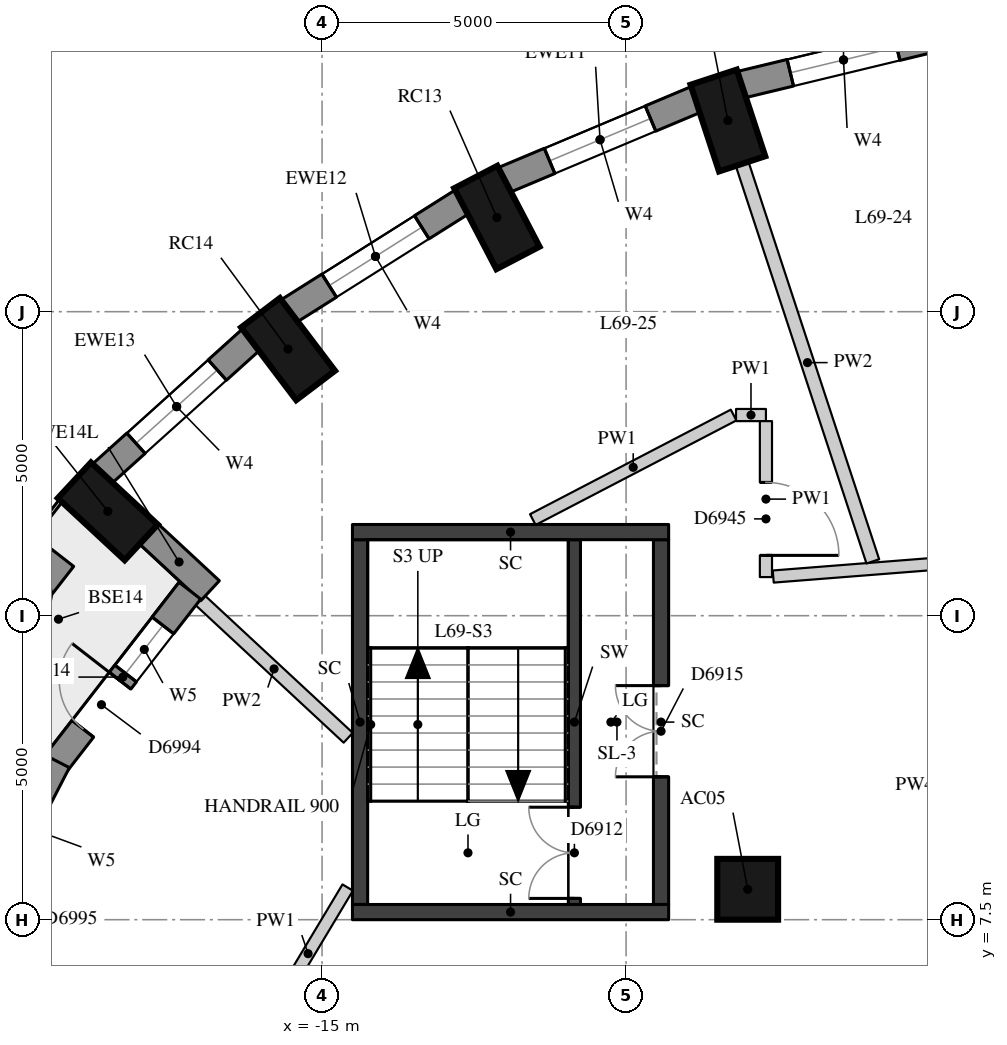
"""IFC4 building model, lengths in metres.
Left out: names, types, materials, properties, quantities, classifications, styles, units other than length and angle.
Written with IfcOpenShell. Run it as: python <this file> out.ifc"""

import sys

from ifc_helpers import new_model, si_unit, direction, frame, frame_2d, origin, origin_2d, place, context, subcontext, project, spatial, rectangle, extrude, element, fill, save


model = new_model("IFC4")
c1 = context("Model", 3, precision=1e-05, world=origin(), true_north=direction((0.0, 1.0)))
c2 = subcontext(c1, "Body", "Model", "MODEL_VIEW")
j1 = project(units=[si_unit("LENGTHUNIT", "METRE"), si_unit("PLANEANGLEUNIT", "RADIAN")], contexts=[c1])
p1 = place(None, origin())
s1 = spatial("IfcSite", under=j1, at=p1, CompositionType="ELEMENT")
p2 = place(p1, origin())
s2 = spatial("IfcBuilding", under=s1, at=p2, CompositionType="ELEMENT")
p3 = place(p2, frame((0.0, 0.0, 243.2)))
s3 = spatial("IfcBuildingStorey", under=s2, at=p3, CompositionType="ELEMENT", Elevation=243.2)
for number, where, z_axis, x_axis in (
    (1, (-8.326, 20.644, 0.0), (0.0, 0.0, 1.0), (-0.312, 0.95, 0.0)),
    (2, (-12.125, 19.05, 0.0), (0.0, 0.0, 1.0), (-0.462, 0.887, 0.0)),
    (3, (-15.559, 16.885, 0.0), (0.0, 0.0, 1.0), (-0.604, 0.797, 0.0)),
    (4, (-18.523, 14.216, 0.0), (0.0, 0.0, 1.0), (-0.733, 0.681, 0.0)),
):
    element("IfcColumn", number, at=place(p3, frame(where, z_axis=z_axis, x_axis=x_axis)), inside=s3, PredefinedType="COLUMN", context=c2, shape_type="SweptSolid", body=[
        extrude(rectangle(XDim=1.5, YDim=0.8, at=origin_2d()), origin(), (0.0, 0.0, 1.0), 3.3),
    ])
p4 = place(p3, frame((-8.0, 8.0, 0.0), z_axis=(0.0, 0.0, 1.0), x_axis=(1.0, 0.0, 0.0)))
e5 = element("IfcColumn", 5, at=p4, inside=s3, PredefinedType="COLUMN", context=c2, shape_type="SweptSolid", body=[
    extrude(rectangle(XDim=1.0, YDim=1.0, at=origin_2d()), origin(), (0.0, 0.0, 1.0), 3.3),
])
p5 = place(p3, frame((-4.729, 22.05, 0.0), z_axis=(0.0, 0.0, 1.0), x_axis=(-0.972099278496, -0.23456980357, 0.0)))
e6 = element("IfcWall", 6, at=p5, inside=s3, PredefinedType="SOLIDWALL", context=c2, shape_type="SweptSolid", body=[
    extrude(rectangle(XDim=3.487, YDim=0.45, at=frame_2d((1.743, 0.0))), origin(), (0.0, 0.0, 1.0), 3.02),
])
p6 = place(p5, frame((0.843, 0.0, 0.4)))
e7 = element("IfcOpeningElement", 7, at=p6, cuts=e6, PredefinedType="OPENING", context=c2, shape_type="SweptSolid", body=[
    extrude(rectangle(XDim=1.8, YDim=1.75, at=frame_2d((0.9, 0.875))), frame((0.0, 0.235, 0.0), z_axis=(0.0, -1.0, 0.0), x_axis=(1.0, 0.0, 0.0)), (0.0, 0.0, 1.0), 0.47),
])
p7 = place(p3, frame((-8.841, 20.995, 0.0), z_axis=(0.0, 0.0, 1.0), x_axis=(-0.922024627475, -0.387131226239, 0.0)))
e8 = element("IfcWall", 8, at=p7, inside=s3, PredefinedType="SOLIDWALL", context=c2, shape_type="SweptSolid", body=[
    extrude(rectangle(XDim=3.443, YDim=0.45, at=frame_2d((1.722, 0.0))), origin(), (0.0, 0.0, 1.0), 3.02),
])
p8 = place(p7, frame((0.822, 0.0, 0.4)))
e9 = element("IfcOpeningElement", 9, at=p8, cuts=e8, PredefinedType="OPENING", context=c2, shape_type="SweptSolid", body=[
    extrude(rectangle(XDim=1.8, YDim=1.75, at=frame_2d((0.9, 0.875))), frame((0.0, 0.235, 0.0), z_axis=(0.0, -1.0, 0.0), x_axis=(1.0, 0.0, 0.0)), (0.0, 0.0, 1.0), 0.47),
])
p9 = place(p3, frame((-12.69, 19.311, 0.0), z_axis=(0.0, 0.0, 1.0), x_axis=(-0.845929139811, -0.53329531258, 0.0)))
e10 = element("IfcWall", 10, at=p9, inside=s3, PredefinedType="SOLIDWALL", context=c2, shape_type="SweptSolid", body=[
    extrude(rectangle(XDim=3.385, YDim=0.45, at=frame_2d((1.692, 0.0))), origin(), (0.0, 0.0, 1.0), 3.02),
])
p10 = place(p9, frame((0.792, 0.0, 0.4)))
e11 = element("IfcOpeningElement", 11, at=p10, cuts=e10, PredefinedType="OPENING", context=c2, shape_type="SweptSolid", body=[
    extrude(rectangle(XDim=1.8, YDim=1.75, at=frame_2d((0.9, 0.875))), frame((0.0, 0.235, 0.0), z_axis=(0.0, -1.0, 0.0), x_axis=(1.0, 0.0, 0.0)), (0.0, 0.0, 1.0), 0.47),
])
p11 = place(p3, frame((-16.159, 17.047, 0.0), z_axis=(0.0, 0.0, 1.0), x_axis=(-0.743166014219, -0.669107073128, 0.0)))
e12 = element("IfcWall", 12, at=p11, inside=s3, PredefinedType="SOLIDWALL", context=c2, shape_type="SweptSolid", body=[
    extrude(rectangle(XDim=3.316, YDim=0.45, at=frame_2d((1.658, 0.0))), origin(), (0.0, 0.0, 1.0), 3.02),
])
p12 = place(p11, frame((0.758, 0.0, 0.4)))
e13 = element("IfcOpeningElement", 13, at=p12, cuts=e12, PredefinedType="OPENING", context=c2, shape_type="SweptSolid", body=[
    extrude(rectangle(XDim=1.8, YDim=1.75, at=frame_2d((0.9, 0.875))), frame((0.0, 0.235, 0.0), z_axis=(0.0, -1.0, 0.0), x_axis=(1.0, 0.0, 0.0)), (0.0, 0.0, 1.0), 0.47),
])
p13 = place(p3, frame((-17.861, 13.857, 0.0), z_axis=(0.0, 0.0, 1.0), x_axis=(0.732605925603, -0.680653037731, 0.0)))
e14 = element("IfcWall", 14, at=p13, inside=s3, PredefinedType="SOLIDWALL", context=c2, shape_type="SweptSolid", body=[
    extrude(rectangle(XDim=1.391, YDim=0.45, at=frame_2d((0.695, 0.0))), origin(), (0.0, 0.0, 1.0), 3.02),
])
p14 = place(p3, frame((-17.174, 12.911, 0.0), z_axis=(0.0, 0.0, 1.0), x_axis=(-0.612774197557, -0.79025804824, 0.0)))
e15 = element("IfcWall", 15, at=p14, inside=s3, PredefinedType="SOLIDWALL", context=c2, shape_type="SweptSolid", body=[
    extrude(rectangle(XDim=3.596, YDim=0.45, at=frame_2d((1.798, 0.0))), origin(), (0.0, 0.0, 1.0), 3.02),
])
p15 = place(p14, frame((0.723, 0.0, 0.4)))
e16 = element("IfcOpeningElement", 16, at=p15, cuts=e15, PredefinedType="OPENING", context=c2, shape_type="SweptSolid", body=[
    extrude(rectangle(XDim=1.0, YDim=1.75, at=frame_2d((0.5, 0.875))), frame((0.0, 0.235, 0.0), z_axis=(0.0, -1.0, 0.0), x_axis=(1.0, 0.0, 0.0)), (0.0, 0.0, 1.0), 0.47),
])
p16 = place(p14, frame((1.873, 0.0, 0.0)))
e17 = element("IfcOpeningElement", 17, at=p16, cuts=e15, PredefinedType="OPENING", context=c2, shape_type="SweptSolid", body=[
    extrude(rectangle(XDim=1.0, YDim=2.15, at=frame_2d((0.5, 1.075))), frame((0.0, 0.235, 0.0), z_axis=(0.0, -1.0, 0.0), x_axis=(1.0, 0.0, 0.0)), (0.0, 0.0, 1.0), 0.47),
])
p17 = place(p3, frame((-19.355, 10.104, 0.0), z_axis=(0.0, 0.0, 1.0), x_axis=(-0.458852093952, -0.888512665006, 0.0)))
e18 = element("IfcWall", 18, at=p17, inside=s3, PredefinedType="SOLIDWALL", context=c2, shape_type="SweptSolid", body=[
    extrude(rectangle(XDim=3.538, YDim=0.45, at=frame_2d((1.769, 0.0))), origin(), (0.0, 0.0, 1.0), 3.02),
])
p18 = place(p17, frame((0.694, 0.0, 0.4)))
e19 = element("IfcOpeningElement", 19, at=p18, cuts=e18, PredefinedType="OPENING", context=c2, shape_type="SweptSolid", body=[
    extrude(rectangle(XDim=1.0, YDim=1.75, at=frame_2d((0.5, 0.875))), frame((0.0, 0.235, 0.0), z_axis=(0.0, -1.0, 0.0), x_axis=(1.0, 0.0, 0.0)), (0.0, 0.0, 1.0), 0.47),
])
p19 = place(p17, frame((1.844, 0.0, 0.0)))
e20 = element("IfcOpeningElement", 20, at=p19, cuts=e18, PredefinedType="OPENING", context=c2, shape_type="SweptSolid", body=[
    extrude(rectangle(XDim=1.0, YDim=2.15, at=frame_2d((0.5, 1.075))), frame((0.0, 0.235, 0.0), z_axis=(0.0, -1.0, 0.0), x_axis=(1.0, 0.0, 0.0)), (0.0, 0.0, 1.0), 0.47),
])
p20 = place(p3, frame((-19.361, 13.525, 0.0), z_axis=(0.0, 0.0, 1.0), x_axis=(-0.613884271235, -0.789396035923, 0.0)))
e21 = element("IfcWall", 21, at=p20, inside=s3, PredefinedType="USERDEFINED", context=c2, shape_type="SweptSolid", body=[
    extrude(rectangle(XDim=1.8, YDim=0.7, at=frame_2d((0.9, 0.0))), origin(), (0.0, 0.0, 1.0), 0.75),
])
p21 = place(p3, frame((-10.85, 7.75, 0.0), z_axis=(0.0, 0.0, 1.0), x_axis=(0.0, 1.0, 0.0)))
e22 = element("IfcWall", 22, at=p21, inside=s3, PredefinedType="SHEAR", context=c2, shape_type="SweptSolid", body=[
    extrude(rectangle(XDim=6.0, YDim=0.2, at=frame_2d((3.0, 0.0))), origin(), (0.0, 0.0, 1.0), 3.02),
])
p22 = place(p21, frame((0.1, 0.0, 0.0)))
e23 = element("IfcOpeningElement", 23, at=p22, cuts=e22, PredefinedType="OPENING", context=c2, shape_type="SweptSolid", body=[
    extrude(rectangle(XDim=1.5, YDim=2.1, at=frame_2d((0.75, 1.05))), frame((0.0, 0.11, 0.0), z_axis=(0.0, -1.0, 0.0), x_axis=(1.0, 0.0, 0.0)), (0.0, 0.0, 1.0), 0.22),
])
p23 = place(p3, frame((-14.375, 7.75, -0.28), z_axis=(0.0, 0.0, 1.0), x_axis=(0.0, 1.0, 0.0)))
e24 = element("IfcWall", 24, at=p23, inside=s3, PredefinedType="SHEAR", context=c2, shape_type="SweptSolid", body=[
    extrude(rectangle(XDim=6.0, YDim=0.25, at=frame_2d((3.0, 0.0))), origin(), (0.0, 0.0, 1.0), 3.3),
])
p24 = place(p3, frame((-9.425, 7.75, -0.28), z_axis=(0.0, 0.0, 1.0), x_axis=(0.0, 1.0, 0.0)))
e25 = element("IfcWall", 25, at=p24, inside=s3, PredefinedType="SHEAR", context=c2, shape_type="SweptSolid", body=[
    extrude(rectangle(XDim=6.0, YDim=0.25, at=frame_2d((3.0, 0.0))), origin(), (0.0, 0.0, 1.0), 3.3),
])
p25 = place(p24, frame((2.1, 0.0, 0.28)))
e26 = element("IfcOpeningElement", 26, at=p25, cuts=e25, PredefinedType="OPENING", context=c2, shape_type="SweptSolid", body=[
    extrude(rectangle(XDim=1.5, YDim=2.1, at=frame_2d((0.75, 1.05))), frame((0.0, 0.135, 0.0), z_axis=(0.0, -1.0, 0.0), x_axis=(1.0, 0.0, 0.0)), (0.0, 0.0, 1.0), 0.27),
])
for number, where, z_axis, x_axis in (
    (27, (-14.5, 13.875, -0.28), (0.0, 0.0, 1.0), (1.0, 0.0, 0.0)),
    (28, (-14.5, 7.625, -0.28), (0.0, 0.0, 1.0), (1.0, 0.0, 0.0)),
):
    element("IfcWall", number, at=place(p3, frame(where, z_axis=z_axis, x_axis=x_axis)), inside=s3, PredefinedType="SHEAR", context=c2, shape_type="SweptSolid", body=[
        extrude(rectangle(XDim=5.2, YDim=0.25, at=frame_2d((2.6, 0.0))), origin(), (0.0, 0.0, 1.0), 3.3),
    ])
p26 = place(p3, frame((-15.882, 5.854, 0.0), z_axis=(0.0, 0.0, 1.0), x_axis=(0.514042598012, 0.857764657368, 0.0)))
e29 = element("IfcWall", 29, at=p26, inside=s3, PredefinedType="PARTITIONING", context=c2, shape_type="SweptSolid", body=[
    extrude(rectangle(XDim=2.536, YDim=0.2, at=frame_2d((1.268, 0.0))), origin(), (0.0, 0.0, 1.0), 3.02),
])
p27 = place(p3, frame((-11.534, 14.081, 0.0), z_axis=(0.0, 0.0, 1.0), x_axis=(0.886975089277, 0.461817270143, 0.0)))
e30 = element("IfcWall", 30, at=p27, inside=s3, PredefinedType="PARTITIONING", context=c2, shape_type="SweptSolid", body=[
    extrude(rectangle(XDim=3.723, YDim=0.2, at=frame_2d((1.861, 0.0))), origin(), (0.0, 0.0, 1.0), 3.02),
])
p28 = place(p3, frame((-8.192, 15.8, 0.0), z_axis=(0.0, 0.0, 1.0), x_axis=(1.0, 0.0, 0.0)))
e31 = element("IfcWall", 31, at=p28, inside=s3, PredefinedType="PARTITIONING", context=c2, shape_type="SweptSolid", body=[
    extrude(rectangle(XDim=0.492, YDim=0.2, at=frame_2d((0.246, 0.0))), origin(), (0.0, 0.0, 1.0), 3.02),
])
p29 = place(p3, frame((-7.7, 15.7, 0.0), z_axis=(0.0, 0.0, 1.0), x_axis=(0.0, -1.0, 0.0)))
e32 = element("IfcWall", 32, at=p29, inside=s3, PredefinedType="PARTITIONING", context=c2, shape_type="SweptSolid", body=[
    extrude(rectangle(XDim=2.565, YDim=0.2, at=frame_2d((1.282, 0.0))), origin(), (0.0, 0.0, 1.0), 3.02),
])
p30 = place(p29, frame((1.008, 0.0, 0.0)))
e33 = element("IfcOpeningElement", 33, at=p30, cuts=e32, PredefinedType="OPENING", context=c2, shape_type="SweptSolid", body=[
    extrude(rectangle(XDim=1.2, YDim=2.1, at=frame_2d((0.6, 1.05))), frame((0.0, 0.11, 0.0), z_axis=(0.0, -1.0, 0.0), x_axis=(1.0, 0.0, 0.0)), (0.0, 0.0, 1.0), 0.22),
])
p31 = place(p3, frame((-7.58, 13.144, 0.0), z_axis=(0.0, 0.0, 1.0), x_axis=(0.996921908045, 0.078400951905, 0.0)))
e34 = element("IfcWall", 34, at=p31, inside=s3, PredefinedType="PARTITIONING", context=c2, shape_type="SweptSolid", body=[
    extrude(rectangle(XDim=10.482, YDim=0.2, at=frame_2d((5.241, 0.0))), origin(), (0.0, 0.0, 1.0), 2.57),
])
p32 = place(p31, frame((6.99, 0.0, 0.0)))
e35 = element("IfcOpeningElement", 35, at=p32, cuts=e34, PredefinedType="OPENING", context=c2, shape_type="SweptSolid", body=[
    extrude(rectangle(XDim=1.1, YDim=2.1, at=frame_2d((0.55, 1.05))), frame((0.0, 0.11, 0.0), z_axis=(0.0, -1.0, 0.0), x_axis=(1.0, 0.0, 0.0)), (0.0, 0.0, 1.0), 0.22),
])
p33 = place(p31, frame((2.696, 0.0, 0.0)))
e36 = element("IfcOpeningElement", 36, at=p33, cuts=e34, PredefinedType="OPENING", context=c2, shape_type="SweptSolid", body=[
    extrude(rectangle(XDim=0.9, YDim=2.1, at=frame_2d((0.45, 1.05))), frame((0.0, 0.11, 0.0), z_axis=(0.0, -1.0, 0.0), x_axis=(1.0, 0.0, 0.0)), (0.0, 0.0, 1.0), 0.22),
])
p34 = place(p3, frame((-8.091, 19.932, 0.0), z_axis=(0.0, 0.0, 1.0), x_axis=(0.312277225251, -0.949991018162, 0.0)))
e37 = element("IfcWall", 37, at=p34, inside=s3, PredefinedType="PARTITIONING", context=c2, shape_type="SweptSolid", body=[
    extrude(rectangle(XDim=6.883, YDim=0.22, at=frame_2d((3.441, 0.0))), origin(), (0.0, 0.0, 1.0), 3.02),
])
p35 = place(p3, frame((-17.009, 12.758, 0.0), z_axis=(0.0, 0.0, 1.0), x_axis=(0.732631495403, -0.680625515202, 0.0)))
e38 = element("IfcWall", 38, at=p35, inside=s3, PredefinedType="PARTITIONING", context=c2, shape_type="SweptSolid", body=[
    extrude(rectangle(XDim=3.328, YDim=0.22, at=frame_2d((1.664, 0.0))), origin(), (0.0, 0.0, 1.0), 3.02),
])
p36 = place(p6, origin())
e39 = element("IfcWindow", 39, at=p36, inside=s3, PartitioningType="SINGLE_PANEL", PredefinedType="WINDOW", context=c2, shape_type="SweptSolid", body=[
    extrude(rectangle(XDim=1.8, YDim=1.75, at=frame_2d((0.9, 0.875))), frame((0.0, 0.035, 0.0), z_axis=(0.0, -1.0, 0.0), x_axis=(1.0, 0.0, 0.0)), (0.0, 0.0, 1.0), 0.06),
])
fill(e7, e39)
p37 = place(p8, origin())
e40 = element("IfcWindow", 40, at=p37, inside=s3, PartitioningType="SINGLE_PANEL", PredefinedType="WINDOW", context=c2, shape_type="SweptSolid", body=[
    extrude(rectangle(XDim=1.8, YDim=1.75, at=frame_2d((0.9, 0.875))), frame((0.0, 0.035, 0.0), z_axis=(0.0, -1.0, 0.0), x_axis=(1.0, 0.0, 0.0)), (0.0, 0.0, 1.0), 0.06),
])
fill(e9, e40)
p38 = place(p10, origin())
e41 = element("IfcWindow", 41, at=p38, inside=s3, PartitioningType="SINGLE_PANEL", PredefinedType="WINDOW", context=c2, shape_type="SweptSolid", body=[
    extrude(rectangle(XDim=1.8, YDim=1.75, at=frame_2d((0.9, 0.875))), frame((0.0, 0.035, 0.0), z_axis=(0.0, -1.0, 0.0), x_axis=(1.0, 0.0, 0.0)), (0.0, 0.0, 1.0), 0.06),
])
fill(e11, e41)
p39 = place(p12, origin())
e42 = element("IfcWindow", 42, at=p39, inside=s3, PartitioningType="SINGLE_PANEL", PredefinedType="WINDOW", context=c2, shape_type="SweptSolid", body=[
    extrude(rectangle(XDim=1.8, YDim=1.75, at=frame_2d((0.9, 0.875))), frame((0.0, 0.035, 0.0), z_axis=(0.0, -1.0, 0.0), x_axis=(1.0, 0.0, 0.0)), (0.0, 0.0, 1.0), 0.06),
])
fill(e13, e42)
p40 = place(p15, origin())
e43 = element("IfcWindow", 43, at=p40, inside=s3, PartitioningType="SINGLE_PANEL", PredefinedType="WINDOW", context=c2, shape_type="SweptSolid", body=[
    extrude(rectangle(XDim=1.0, YDim=1.75, at=frame_2d((0.5, 0.875))), frame((0.0, 0.035, 0.0), z_axis=(0.0, -1.0, 0.0), x_axis=(1.0, 0.0, 0.0)), (0.0, 0.0, 1.0), 0.06),
])
fill(e16, e43)
p41 = place(p16, frame((1.0, 0.0, 0.0), z_axis=(0.0, 0.0, 1.0), x_axis=(-1.0, 0.0, 0.0)))
e44 = element("IfcDoor", 44, at=p41, inside=s3, OperationType="SINGLE_SWING_RIGHT", PredefinedType="DOOR", context=c2, shape_type="SweptSolid", body=[
    extrude(rectangle(XDim=1.0, YDim=2.15, at=frame_2d((0.5, 1.075))), frame((0.0, 0.075, 0.0), z_axis=(0.0, -1.0, 0.0), x_axis=(1.0, 0.0, 0.0)), (0.0, 0.0, 1.0), 0.05),
])
fill(e17, e44)
p42 = place(p22, origin())
e45 = element("IfcDoor", 45, at=p42, inside=s3, OperationType="DOUBLE_DOOR_SINGLE_SWING", PredefinedType="DOOR", context=c2, shape_type="SweptSolid", body=[
    extrude(rectangle(XDim=1.5, YDim=2.1, at=frame_2d((0.75, 1.05))), frame((0.0, 0.025, 0.0), z_axis=(0.0, -1.0, 0.0), x_axis=(1.0, 0.0, 0.0)), (0.0, 0.0, 1.0), 0.05),
])
fill(e23, e45)
p43 = place(p25, origin())
e46 = element("IfcDoor", 46, at=p43, inside=s3, OperationType="DOUBLE_DOOR_SINGLE_SWING", PredefinedType="DOOR", context=c2, shape_type="SweptSolid", body=[
    extrude(rectangle(XDim=1.5, YDim=2.1, at=frame_2d((0.75, 1.05))), frame((0.0, 0.025, 0.0), z_axis=(0.0, -1.0, 0.0), x_axis=(1.0, 0.0, 0.0)), (0.0, 0.0, 1.0), 0.05),
])
fill(e26, e46)
p44 = place(p30, origin())
e47 = element("IfcDoor", 47, at=p44, inside=s3, OperationType="SINGLE_SWING_RIGHT", PredefinedType="DOOR", context=c2, shape_type="SweptSolid", body=[
    extrude(rectangle(XDim=1.2, YDim=2.1, at=frame_2d((0.6, 1.05))), frame((0.0, 0.025, 0.0), z_axis=(0.0, -1.0, 0.0), x_axis=(1.0, 0.0, 0.0)), (0.0, 0.0, 1.0), 0.05),
])
fill(e33, e47)
save(model, sys.argv[1])
